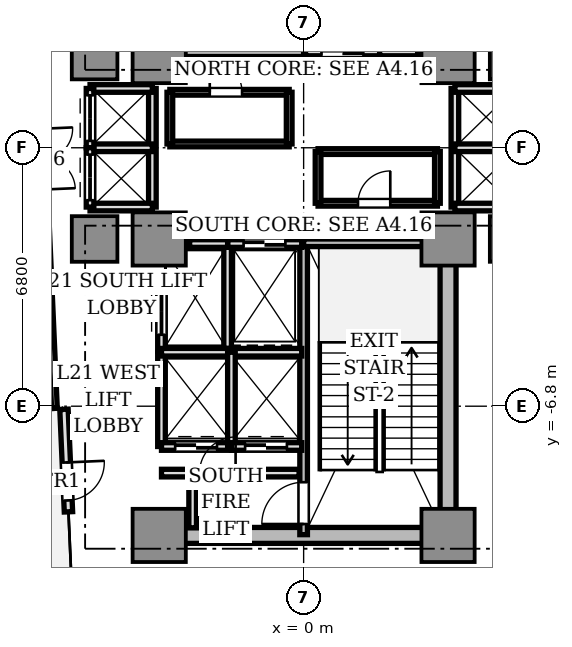
"""IFC4 building model, lengths in metres.
Left out: names, types, materials, properties, quantities, classifications, styles, units other than length and angle.
Written with IfcOpenShell. Run it as: python <this file> out.ifc"""

import sys

from ifc_helpers import new_model, si_unit, direction, frame, frame_2d, origin, origin_2d, place, context, subcontext, project, spatial, rectangle, extrude, source, transform, mapped, element, fill, save


model = new_model("IFC4")
c1 = context("Model", 3, precision=1e-05, world=origin(), true_north=direction((0.0, 1.0)))
c2 = subcontext(c1, "Body", "Model", "MODEL_VIEW")
j1 = project(units=[si_unit("LENGTHUNIT", "METRE"), si_unit("PLANEANGLEUNIT", "RADIAN")], contexts=[c1])
p1 = place(None, origin())
s1 = spatial("IfcSite", under=j1, at=p1, CompositionType="ELEMENT")
p2 = place(p1, origin())
s2 = spatial("IfcBuilding", under=s1, at=p2, CompositionType="ELEMENT")
p3 = place(p2, frame((0.0, 0.0, 79.0)))
s3 = spatial("IfcBuildingStorey", under=s2, at=p3, CompositionType="ELEMENT", Elevation=79.0)
p4 = place(p3, frame((-3.55, -10.2, 0.0), z_axis=(0.0, 0.0, 1.0), x_axis=(1.0, 0.0, 0.0)))
e1 = element("IfcWall", 1, at=p4, inside=s3, PredefinedType="SHEAR", context=c2, shape_type="SweptSolid", body=[
    extrude(rectangle(XDim=7.1, YDim=0.42, at=frame_2d((3.55, 0.0))), origin(), (0.0, 0.0, 1.0), 4.26),
])
p5 = place(p3, frame((3.8, -9.75, 0.0), z_axis=(0.0, 0.0, 1.0), x_axis=(0.0, 1.0, 0.0)))
e2 = element("IfcWall", 2, at=p5, inside=s3, PredefinedType="SHEAR", context=c2, shape_type="SweptSolid", body=[
    extrude(rectangle(XDim=6.9, YDim=0.42, at=frame_2d((3.45, 0.0))), origin(), (0.0, 0.0, 1.0), 4.26),
])
m1 = source(origin(), c2, "Body", "SweptSolid", [
    extrude(rectangle(XDim=1.4, YDim=1.4, at=origin_2d()), origin(), (0.0, 0.0, 1.0), 4.26),
])
for number, where, z_axis, x_axis in (
    (3, (-3.8, 2.4, 0.0), (0.0, 0.0, 1.0), (1.0, 0.0, 0.0)),
    (4, (3.8, 2.4, 0.0), (0.0, 0.0, 1.0), (1.0, 0.0, 0.0)),
    (5, (-3.8, -2.4, 0.0), (0.0, 0.0, 1.0), (1.0, 0.0, 0.0)),
    (6, (3.8, -2.4, 0.0), (0.0, 0.0, 1.0), (1.0, 0.0, 0.0)),
    (7, (-3.8, -10.2, 0.0), (0.0, 0.0, 1.0), (1.0, 0.0, 0.0)),
    (8, (3.8, -10.2, 0.0), (0.0, 0.0, 1.0), (1.0, 0.0, 0.0)),
):
    element("IfcColumn", number, at=place(p3, frame(where, z_axis=z_axis, x_axis=x_axis)), inside=s3, PredefinedType="COLUMN", context=c2, shape_type="MappedRepresentation", body=[
        mapped(m1, transform((0.0, 0.0, 0.0), scale=1.0)),
    ])
m2 = source(origin(), c2, "Body", "SweptSolid", [
    extrude(rectangle(XDim=1.2, YDim=1.2, at=origin_2d()), origin(), (0.0, 0.0, 1.0), 4.26),
])
for number, where, z_axis, x_axis in (
    (9, (5.5, 2.4, 0.0), (0.0, 0.0, 1.0), (1.0, 0.0, 0.0)),
    (10, (-5.5, 2.4, 0.0), (0.0, 0.0, 1.0), (1.0, 0.0, 0.0)),
    (11, (5.5, -2.4, 0.0), (0.0, 0.0, 1.0), (1.0, 0.0, 0.0)),
    (12, (-5.5, -2.4, 0.0), (0.0, 0.0, 1.0), (1.0, 0.0, 0.0)),
):
    element("IfcColumn", number, at=place(p3, frame(where, z_axis=z_axis, x_axis=x_axis)), inside=s3, PredefinedType="COLUMN", context=c2, shape_type="MappedRepresentation", body=[
        mapped(m2, transform((0.0, 0.0, 0.0), scale=1.0)),
    ])
p6 = place(p3, frame((-6.306, -6.882, 0.0), z_axis=(0.0, 0.0, 1.0), x_axis=(0.043672655174, -0.999045894436, 0.0)))
e13 = element("IfcWall", 13, at=p6, inside=s3, PredefinedType="STANDARD", context=c2, shape_type="SweptSolid", body=[
    extrude(rectangle(XDim=2.7, YDim=0.22, at=frame_2d((1.35, 0.0))), origin(), (0.0, 0.0, 1.0), 4.26),
])
p7 = place(p6, frame((1.4, 0.0, 0.0)))
e14 = element("IfcOpeningElement", 14, at=p7, cuts=e13, PredefinedType="OPENING", context=c2, shape_type="SweptSolid", body=[
    extrude(rectangle(XDim=1.0, YDim=2.2, at=frame_2d((0.5, 1.1))), frame((0.0, 0.12, 0.0), z_axis=(0.0, -1.0, 0.0), x_axis=(1.0, 0.0, 0.0)), (0.0, 0.0, 1.0), 0.24),
])
p8 = place(p3, frame((0.0, 2.5, 0.0), z_axis=(0.0, 0.0, 1.0), x_axis=(0.0, 1.0, 0.0)))
e15 = element("IfcWall", 15, at=p8, inside=s3, PredefinedType="SOLIDWALL", context=c2, shape_type="SweptSolid", body=[
    extrude(rectangle(XDim=7.68, YDim=0.2, at=frame_2d((3.84, 0.0))), origin(), (0.0, 0.0, 1.0), 4.26),
])
p9 = place(p8, frame((6.5, 0.0, 0.0)))
e16 = element("IfcOpeningElement", 16, at=p9, cuts=e15, PredefinedType="OPENING", context=c2, shape_type="SweptSolid", body=[
    extrude(rectangle(XDim=0.95, YDim=2.15, at=frame_2d((0.475, 1.075))), frame((0.0, 0.11, 0.0), z_axis=(0.0, -1.0, 0.0), x_axis=(1.0, 0.0, 0.0)), (0.0, 0.0, 1.0), 0.22),
])
p10 = place(p3, frame((-3.72, 2.5, 0.0), z_axis=(0.0, 0.0, 1.0), x_axis=(1.0, 0.0, 0.0)))
e17 = element("IfcWall", 17, at=p10, inside=s3, PredefinedType="SOLIDWALL", context=c2, shape_type="SweptSolid", body=[
    extrude(rectangle(XDim=3.72, YDim=0.2, at=frame_2d((1.86, 0.0))), origin(), (0.0, 0.0, 1.0), 4.26),
])
p11 = place(p3, frame((0.0, -10.18, 0.0), z_axis=(0.0, 0.0, 1.0), x_axis=(0.0, 1.0, 0.0)))
e18 = element("IfcWall", 18, at=p11, inside=s3, PredefinedType="SOLIDWALL", context=c2, shape_type="SweptSolid", body=[
    extrude(rectangle(XDim=7.68, YDim=0.2, at=frame_2d((3.84, 0.0))), origin(), (0.0, 0.0, 1.0), 4.26),
])
p12 = place(p11, frame((0.28, 0.0, 0.0)))
e19 = element("IfcOpeningElement", 19, at=p12, cuts=e18, PredefinedType="OPENING", context=c2, shape_type="SweptSolid", body=[
    extrude(rectangle(XDim=1.1, YDim=2.15, at=frame_2d((0.55, 1.075))), frame((0.0, 0.11, 0.0), z_axis=(0.0, -1.0, 0.0), x_axis=(1.0, 0.0, 0.0)), (0.0, 0.0, 1.0), 0.22),
])
p13 = place(p3, frame((0.0, -2.5, 0.0), z_axis=(0.0, 0.0, 1.0), x_axis=(1.0, 0.0, 0.0)))
e20 = element("IfcWall", 20, at=p13, inside=s3, PredefinedType="SOLIDWALL", context=c2, shape_type="SweptSolid", body=[
    extrude(rectangle(XDim=3.72, YDim=0.2, at=frame_2d((1.86, 0.0))), origin(), (0.0, 0.0, 1.0), 4.26),
])
p14 = place(p3, frame((2.0, 2.5, 0.0), z_axis=(0.0, 0.0, 1.0), x_axis=(0.0, 1.0, 0.0)))
e21 = element("IfcWall", 21, at=p14, inside=s3, PredefinedType="SOLIDWALL", context=c2, shape_type="SweptSolid", body=[
    extrude(rectangle(XDim=2.78, YDim=0.2, at=frame_2d((1.39, 0.0))), origin(), (0.0, 0.0, 1.0), 3.81),
])
p15 = place(p3, frame((0.05, 2.52, 0.0), z_axis=(0.0, 0.0, 1.0), x_axis=(1.0, 0.0, 0.0)))
e22 = element("IfcWall", 22, at=p15, inside=s3, PredefinedType="SOLIDWALL", context=c2, shape_type="SweptSolid", body=[
    extrude(rectangle(XDim=1.95, YDim=0.2, at=frame_2d((0.975, 0.0))), origin(), (0.0, 0.0, 1.0), 3.81),
])
p16 = place(p15, frame((0.42, 0.0, 0.0)))
e23 = element("IfcOpeningElement", 23, at=p16, cuts=e22, PredefinedType="OPENING", context=c2, shape_type="SweptSolid", body=[
    extrude(rectangle(XDim=1.1, YDim=2.2, at=frame_2d((0.55, 1.1))), frame((0.0, 0.11, 0.0), z_axis=(0.0, -1.0, 0.0), x_axis=(1.0, 0.0, 0.0)), (0.0, 0.0, 1.0), 0.22),
])
p17 = place(p3, frame((-2.0, -5.28, 0.0), z_axis=(0.0, 0.0, 1.0), x_axis=(0.0, 1.0, 0.0)))
e24 = element("IfcWall", 24, at=p17, inside=s3, PredefinedType="SOLIDWALL", context=c2, shape_type="SweptSolid", body=[
    extrude(rectangle(XDim=2.78, YDim=0.2, at=frame_2d((1.39, 0.0))), origin(), (0.0, 0.0, 1.0), 3.81),
])
p18 = place(p3, frame((-2.0, -2.52, 0.0), z_axis=(0.0, 0.0, 1.0), x_axis=(1.0, 0.0, 0.0)))
e25 = element("IfcWall", 25, at=p18, inside=s3, PredefinedType="SOLIDWALL", context=c2, shape_type="SweptSolid", body=[
    extrude(rectangle(XDim=1.95, YDim=0.2, at=frame_2d((0.975, 0.0))), origin(), (0.0, 0.0, 1.0), 3.81),
])
p19 = place(p18, frame((0.42, 0.0, 0.0)))
e26 = element("IfcOpeningElement", 26, at=p19, cuts=e25, PredefinedType="OPENING", context=c2, shape_type="SweptSolid", body=[
    extrude(rectangle(XDim=1.1, YDim=2.2, at=frame_2d((0.55, 1.1))), frame((0.0, 0.11, 0.0), z_axis=(0.0, -1.0, 0.0), x_axis=(1.0, 0.0, 0.0)), (0.0, 0.0, 1.0), 0.22),
])
for number, where, z_axis, x_axis in (
    (27, (2.0, 2.52, 0.0), (0.0, 0.0, 1.0), (1.0, 0.0, 0.0)),
    (28, (-3.0, -2.52, 0.0), (0.0, 0.0, 1.0), (1.0, 0.0, 0.0)),
):
    element("IfcWall", number, at=place(p3, frame(where, z_axis=z_axis, x_axis=x_axis)), inside=s3, PredefinedType="SOLIDWALL", context=c2, shape_type="SweptSolid", body=[
        extrude(rectangle(XDim=1.0, YDim=0.2, at=frame_2d((0.5, 0.0))), origin(), (0.0, 0.0, 1.0), 3.81),
    ])
p20 = place(p3, frame((-3.74, -5.36, 0.0), z_axis=(0.0, 0.0, 1.0), x_axis=(0.0, 1.0, 0.0)))
e29 = element("IfcWall", 29, at=p20, inside=s3, PredefinedType="SOLIDWALL", context=c2, shape_type="SweptSolid", body=[
    extrude(rectangle(XDim=2.08, YDim=0.2, at=frame_2d((1.04, 0.0))), origin(), (0.0, 0.0, 1.0), 3.81),
])
p21 = place(p20, frame((0.44, 0.0, 0.0)))
e30 = element("IfcOpeningElement", 30, at=p21, cuts=e29, PredefinedType="OPENING", context=c2, shape_type="SweptSolid", body=[
    extrude(rectangle(XDim=1.2, YDim=2.2, at=frame_2d((0.6, 1.1))), frame((0.0, 0.11, 0.0), z_axis=(0.0, -1.0, 0.0), x_axis=(1.0, 0.0, 0.0)), (0.0, 0.0, 1.0), 0.22),
])
p22 = place(p3, frame((-3.74, -7.86, 0.0), z_axis=(0.0, 0.0, 1.0), x_axis=(0.0, 1.0, 0.0)))
e31 = element("IfcWall", 31, at=p22, inside=s3, PredefinedType="SOLIDWALL", context=c2, shape_type="SweptSolid", body=[
    extrude(rectangle(XDim=2.48, YDim=0.2, at=frame_2d((1.24, 0.0))), origin(), (0.0, 0.0, 1.0), 3.81),
])
p23 = place(p3, frame((-3.74, -7.86, 0.0), z_axis=(0.0, 0.0, 1.0), x_axis=(1.0, 0.0, 0.0)))
e32 = element("IfcWall", 32, at=p23, inside=s3, PredefinedType="SOLIDWALL", context=c2, shape_type="SweptSolid", body=[
    extrude(rectangle(XDim=1.84, YDim=0.2, at=frame_2d((0.92, 0.0))), origin(), (0.0, 0.0, 1.0), 3.81),
])
p24 = place(p23, frame((0.36, 0.0, 0.0)))
e33 = element("IfcOpeningElement", 33, at=p24, cuts=e32, PredefinedType="OPENING", context=c2, shape_type="SweptSolid", body=[
    extrude(rectangle(XDim=1.1, YDim=2.2, at=frame_2d((0.55, 1.1))), frame((0.0, 0.11, 0.0), z_axis=(0.0, -1.0, 0.0), x_axis=(1.0, 0.0, 0.0)), (0.0, 0.0, 1.0), 0.22),
])
p25 = place(p3, frame((-3.74, -5.38, 0.0), z_axis=(0.0, 0.0, 1.0), x_axis=(1.0, 0.0, 0.0)))
e34 = element("IfcWall", 34, at=p25, inside=s3, PredefinedType="SOLIDWALL", context=c2, shape_type="SweptSolid", body=[
    extrude(rectangle(XDim=3.69, YDim=0.2, at=frame_2d((1.845, 0.0))), origin(), (0.0, 0.0, 1.0), 3.81),
])
p26 = place(p3, frame((-1.9, -7.86, 0.0), z_axis=(0.0, 0.0, 1.0), x_axis=(0.0, 1.0, 0.0)))
e35 = element("IfcWall", 35, at=p26, inside=s3, PredefinedType="SOLIDWALL", context=c2, shape_type="SweptSolid", body=[
    extrude(rectangle(XDim=2.48, YDim=0.2, at=frame_2d((1.24, 0.0))), origin(), (0.0, 0.0, 1.0), 3.81),
])
p27 = place(p3, frame((-1.9, -7.86, 0.0), z_axis=(0.0, 0.0, 1.0), x_axis=(1.0, 0.0, 0.0)))
e36 = element("IfcWall", 36, at=p27, inside=s3, PredefinedType="SOLIDWALL", context=c2, shape_type="SweptSolid", body=[
    extrude(rectangle(XDim=1.85, YDim=0.2, at=frame_2d((0.925, 0.0))), origin(), (0.0, 0.0, 1.0), 3.81),
])
p28 = place(p27, frame((0.36, 0.0, 0.0)))
e37 = element("IfcOpeningElement", 37, at=p28, cuts=e36, PredefinedType="OPENING", context=c2, shape_type="SweptSolid", body=[
    extrude(rectangle(XDim=1.1, YDim=2.2, at=frame_2d((0.55, 1.1))), frame((0.0, 0.11, 0.0), z_axis=(0.0, -1.0, 0.0), x_axis=(1.0, 0.0, 0.0)), (0.0, 0.0, 1.0), 0.22),
])
p29 = place(p3, frame((3.98, -1.56, 0.0), z_axis=(0.0, 0.0, 1.0), x_axis=(0.0, 1.0, 0.0)))
e38 = element("IfcWall", 38, at=p29, inside=s3, PredefinedType="SOLIDWALL", context=c2, shape_type="SweptSolid", body=[
    extrude(rectangle(XDim=3.12, YDim=0.2, at=frame_2d((1.56, 0.0))), origin(), (0.0, 0.0, 1.0), 3.43),
])
for number, where, z_axis, x_axis in (
    (39, (3.98, 1.56, 0.0), (0.0, 0.0, 1.0), (1.0, 0.0, 0.0)),
    (40, (3.98, -1.56, 0.0), (0.0, 0.0, 1.0), (1.0, 0.0, 0.0)),
    (41, (3.98, 0.0, 0.0), (0.0, 0.0, 1.0), (1.0, 0.0, 0.0)),
):
    element("IfcWall", number, at=place(p3, frame(where, z_axis=z_axis, x_axis=x_axis)), inside=s3, PredefinedType="SOLIDWALL", context=c2, shape_type="SweptSolid", body=[
        extrude(rectangle(XDim=1.64, YDim=0.2, at=frame_2d((0.82, 0.0))), origin(), (0.0, 0.0, 1.0), 3.81),
    ])
p30 = place(p3, frame((-3.98, -1.56, 0.0), z_axis=(0.0, 0.0, 1.0), x_axis=(0.0, 1.0, 0.0)))
e42 = element("IfcWall", 42, at=p30, inside=s3, PredefinedType="SOLIDWALL", context=c2, shape_type="SweptSolid", body=[
    extrude(rectangle(XDim=3.12, YDim=0.2, at=frame_2d((1.56, 0.0))), origin(), (0.0, 0.0, 1.0), 3.43),
])
for number, where, z_axis, x_axis in (
    (43, (-5.62, 1.56, 0.0), (0.0, 0.0, 1.0), (1.0, 0.0, 0.0)),
    (44, (-5.62, -1.56, 0.0), (0.0, 0.0, 1.0), (1.0, 0.0, 0.0)),
    (45, (-5.62, 0.0, 0.0), (0.0, 0.0, 1.0), (1.0, 0.0, 0.0)),
):
    element("IfcWall", number, at=place(p3, frame(where, z_axis=z_axis, x_axis=x_axis)), inside=s3, PredefinedType="SOLIDWALL", context=c2, shape_type="SweptSolid", body=[
        extrude(rectangle(XDim=1.64, YDim=0.2, at=frame_2d((0.82, 0.0))), origin(), (0.0, 0.0, 1.0), 3.81),
    ])
p31 = place(p3, frame((-5.62, 0.0, 0.0), z_axis=(0.0, 0.0, 1.0), x_axis=(0.0, 1.0, 0.0)))
e46 = element("IfcWall", 46, at=p31, inside=s3, PredefinedType="SOLIDWALL", context=c2, shape_type="SweptSolid", body=[
    extrude(rectangle(XDim=1.56, YDim=0.2, at=frame_2d((0.78, 0.0))), origin(), (0.0, 0.0, 1.0), 3.81),
])
p32 = place(p31, frame((0.18, 0.0, 0.0)))
e47 = element("IfcOpeningElement", 47, at=p32, cuts=e46, PredefinedType="OPENING", context=c2, shape_type="SweptSolid", body=[
    extrude(rectangle(XDim=1.2, YDim=2.2, at=frame_2d((0.6, 1.1))), frame((0.0, 0.11, 0.0), z_axis=(0.0, -1.0, 0.0), x_axis=(1.0, 0.0, 0.0)), (0.0, 0.0, 1.0), 0.22),
])
p33 = place(p3, frame((-5.62, -1.56, 0.0), z_axis=(0.0, 0.0, 1.0), x_axis=(0.0, 1.0, 0.0)))
e48 = element("IfcWall", 48, at=p33, inside=s3, PredefinedType="SOLIDWALL", context=c2, shape_type="SweptSolid", body=[
    extrude(rectangle(XDim=1.56, YDim=0.2, at=frame_2d((0.78, 0.0))), origin(), (0.0, 0.0, 1.0), 3.81),
])
p34 = place(p33, frame((0.18, 0.0, 0.0)))
e49 = element("IfcOpeningElement", 49, at=p34, cuts=e48, PredefinedType="OPENING", context=c2, shape_type="SweptSolid", body=[
    extrude(rectangle(XDim=1.2, YDim=2.2, at=frame_2d((0.6, 1.1))), frame((0.0, 0.11, 0.0), z_axis=(0.0, -1.0, 0.0), x_axis=(1.0, 0.0, 0.0)), (0.0, 0.0, 1.0), 0.22),
])
p35 = place(p3, frame((-3.74, -8.56, 0.0), z_axis=(0.0, 0.0, 1.0), x_axis=(1.0, 0.0, 0.0)))
e50 = element("IfcWall", 50, at=p35, inside=s3, PredefinedType="SOLIDWALL", context=c2, shape_type="SweptSolid", body=[
    extrude(rectangle(XDim=3.62, YDim=0.2, at=frame_2d((1.81, 0.0))), origin(), (0.0, 0.0, 1.0), 3.81),
])
p36 = place(p35, frame((1.0, 0.0, 0.0)))
e51 = element("IfcOpeningElement", 51, at=p36, cuts=e50, PredefinedType="OPENING", context=c2, shape_type="SweptSolid", body=[
    extrude(rectangle(XDim=0.95, YDim=2.15, at=frame_2d((0.475, 1.075))), frame((0.0, 0.11, 0.0), z_axis=(0.0, -1.0, 0.0), x_axis=(1.0, 0.0, 0.0)), (0.0, 0.0, 1.0), 0.22),
])
p37 = place(p3, frame((-2.92, -10.0, 0.0), z_axis=(0.0, 0.0, 1.0), x_axis=(0.0, 1.0, 0.0)))
e52 = element("IfcWall", 52, at=p37, inside=s3, PredefinedType="SOLIDWALL", context=c2, shape_type="SweptSolid", body=[
    extrude(rectangle(XDim=1.44, YDim=0.2, at=frame_2d((0.72, 0.0))), origin(), (0.0, 0.0, 1.0), 3.81),
])
p38 = place(p3, frame((-3.52, 0.1, 0.0), z_axis=(0.0, 0.0, 1.0), x_axis=(1.0, 0.0, 0.0)))
e53 = element("IfcWall", 53, at=p38, inside=s3, PredefinedType="PARTITIONING", context=c2, shape_type="SweptSolid", body=[
    extrude(rectangle(XDim=3.14, YDim=0.15, at=frame_2d((1.57, 0.0))), origin(), (0.0, 0.0, 1.0), 3.81),
])
p39 = place(p3, frame((-3.52, 1.46, 0.0), z_axis=(0.0, 0.0, 1.0), x_axis=(1.0, 0.0, 0.0)))
e54 = element("IfcWall", 54, at=p39, inside=s3, PredefinedType="PARTITIONING", context=c2, shape_type="SweptSolid", body=[
    extrude(rectangle(XDim=3.14, YDim=0.15, at=frame_2d((1.57, 0.0))), origin(), (0.0, 0.0, 1.0), 3.81),
])
p40 = place(p39, frame((1.05, 0.0, 0.0)))
e55 = element("IfcOpeningElement", 55, at=p40, cuts=e54, PredefinedType="OPENING", context=c2, shape_type="SweptSolid", body=[
    extrude(rectangle(XDim=0.85, YDim=2.1, at=frame_2d((0.425, 1.05))), frame((0.0, 0.085, 0.0), z_axis=(0.0, -1.0, 0.0), x_axis=(1.0, 0.0, 0.0)), (0.0, 0.0, 1.0), 0.17),
])
p41 = place(p3, frame((-3.52, 0.1, 0.0), z_axis=(0.0, 0.0, 1.0), x_axis=(0.0, 1.0, 0.0)))
e56 = element("IfcWall", 56, at=p41, inside=s3, PredefinedType="PARTITIONING", context=c2, shape_type="SweptSolid", body=[
    extrude(rectangle(XDim=1.36, YDim=0.15, at=frame_2d((0.68, 0.0))), origin(), (0.0, 0.0, 1.0), 3.43),
])
p42 = place(p3, frame((-0.38, 0.1, 0.0), z_axis=(0.0, 0.0, 1.0), x_axis=(0.0, 1.0, 0.0)))
e57 = element("IfcWall", 57, at=p42, inside=s3, PredefinedType="PARTITIONING", context=c2, shape_type="SweptSolid", body=[
    extrude(rectangle(XDim=1.36, YDim=0.15, at=frame_2d((0.68, 0.0))), origin(), (0.0, 0.0, 1.0), 3.81),
])
p43 = place(p3, frame((0.38, -0.1, 0.0), z_axis=(0.0, 0.0, 1.0), x_axis=(1.0, 0.0, 0.0)))
e58 = element("IfcWall", 58, at=p43, inside=s3, PredefinedType="PARTITIONING", context=c2, shape_type="SweptSolid", body=[
    extrude(rectangle(XDim=3.14, YDim=0.15, at=frame_2d((1.57, 0.0))), origin(), (0.0, 0.0, 1.0), 3.81),
])
p44 = place(p3, frame((0.38, -1.46, 0.0), z_axis=(0.0, 0.0, 1.0), x_axis=(1.0, 0.0, 0.0)))
e59 = element("IfcWall", 59, at=p44, inside=s3, PredefinedType="PARTITIONING", context=c2, shape_type="SweptSolid", body=[
    extrude(rectangle(XDim=3.14, YDim=0.15, at=frame_2d((1.57, 0.0))), origin(), (0.0, 0.0, 1.0), 3.81),
])
p45 = place(p44, frame((1.05, 0.0, 0.0)))
e60 = element("IfcOpeningElement", 60, at=p45, cuts=e59, PredefinedType="OPENING", context=c2, shape_type="SweptSolid", body=[
    extrude(rectangle(XDim=0.85, YDim=2.1, at=frame_2d((0.425, 1.05))), frame((0.0, 0.085, 0.0), z_axis=(0.0, -1.0, 0.0), x_axis=(1.0, 0.0, 0.0)), (0.0, 0.0, 1.0), 0.17),
])
p46 = place(p3, frame((0.38, -1.46, 0.0), z_axis=(0.0, 0.0, 1.0), x_axis=(0.0, 1.0, 0.0)))
e61 = element("IfcWall", 61, at=p46, inside=s3, PredefinedType="PARTITIONING", context=c2, shape_type="SweptSolid", body=[
    extrude(rectangle(XDim=1.36, YDim=0.15, at=frame_2d((0.68, 0.0))), origin(), (0.0, 0.0, 1.0), 3.81),
])
p47 = place(p3, frame((3.52, -1.46, 0.0), z_axis=(0.0, 0.0, 1.0), x_axis=(0.0, 1.0, 0.0)))
e62 = element("IfcWall", 62, at=p47, inside=s3, PredefinedType="PARTITIONING", context=c2, shape_type="SweptSolid", body=[
    extrude(rectangle(XDim=1.36, YDim=0.15, at=frame_2d((0.68, 0.0))), origin(), (0.0, 0.0, 1.0), 3.43),
])
p48 = place(p3, frame((-7.129, 6.245, 0.0), z_axis=(0.0, 0.0, 1.0), x_axis=(0.043609488494, -0.999048653727, 0.0)))
e63 = element("IfcWall", 63, at=p48, inside=s3, PredefinedType="PARTITIONING", context=c2, shape_type="SweptSolid", body=[
    extrude(rectangle(XDim=13.1, YDim=0.15, at=frame_2d((6.55, 0.0))), origin(), (0.0, 0.0, 1.0), 3.81),
])
p49 = place(p48, frame((5.75, 0.0, 0.0)))
e64 = element("IfcOpeningElement", 64, at=p49, cuts=e63, PredefinedType="OPENING", context=c2, shape_type="SweptSolid", body=[
    extrude(rectangle(XDim=1.6, YDim=2.25, at=frame_2d((0.8, 1.125))), frame((0.0, 0.085, 0.0), z_axis=(0.0, -1.0, 0.0), x_axis=(1.0, 0.0, 0.0)), (0.0, 0.0, 1.0), 0.17),
])
m3 = source(origin(), c2, "Body", "SweptSolid", [
    extrude(rectangle(XDim=1.0, YDim=0.05, at=origin_2d()), origin(), (0.0, 0.0, 1.0), 2.2),
])
p50 = place(p7, frame((0.5, 0.0, 0.0)))
e65 = element("IfcDoor", 65, at=p50, inside=s3, OperationType="SINGLE_SWING_LEFT", PredefinedType="DOOR", context=c2, shape_type="MappedRepresentation", body=[
    mapped(m3, transform((0.0, 0.0, 0.0), scale=1.0)),
])
fill(e14, e65)
m4 = source(origin(), c2, "Body", "SweptSolid", [
    extrude(rectangle(XDim=1.1, YDim=0.05, at=origin_2d()), origin(), (0.0, 0.0, 1.0), 2.2),
])
p51 = place(p16, frame((0.55, 0.0, 0.0)))
e66 = element("IfcDoor", 66, at=p51, inside=s3, OperationType="DOUBLE_DOOR_SLIDING", PredefinedType="DOOR", context=c2, shape_type="MappedRepresentation", body=[
    mapped(m4, transform((0.0, 0.0, 0.0), scale=1.0)),
])
fill(e23, e66)
p52 = place(p19, frame((0.55, 0.0, 0.0)))
e67 = element("IfcDoor", 67, at=p52, inside=s3, OperationType="DOUBLE_DOOR_SLIDING", PredefinedType="DOOR", context=c2, shape_type="MappedRepresentation", body=[
    mapped(m4, transform((0.0, 0.0, 0.0), scale=1.0)),
])
fill(e26, e67)
m5 = source(origin(), c2, "Body", "SweptSolid", [
    extrude(rectangle(XDim=1.2, YDim=0.05, at=origin_2d()), origin(), (0.0, 0.0, 1.0), 2.2),
])
p53 = place(p21, frame((0.6, 0.0, 0.0)))
e68 = element("IfcDoor", 68, at=p53, inside=s3, OperationType="DOUBLE_DOOR_SLIDING", PredefinedType="DOOR", context=c2, shape_type="MappedRepresentation", body=[
    mapped(m5, transform((0.0, 0.0, 0.0), scale=1.0)),
])
fill(e30, e68)
p54 = place(p24, frame((0.55, 0.0, 0.0)))
e69 = element("IfcDoor", 69, at=p54, inside=s3, OperationType="DOUBLE_DOOR_SLIDING", PredefinedType="DOOR", context=c2, shape_type="MappedRepresentation", body=[
    mapped(m4, transform((0.0, 0.0, 0.0), scale=1.0)),
])
fill(e33, e69)
p55 = place(p28, frame((0.55, 0.0, 0.0)))
e70 = element("IfcDoor", 70, at=p55, inside=s3, OperationType="DOUBLE_DOOR_SLIDING", PredefinedType="DOOR", context=c2, shape_type="MappedRepresentation", body=[
    mapped(m4, transform((0.0, 0.0, 0.0), scale=1.0)),
])
fill(e37, e70)
p56 = place(p32, frame((0.6, 0.0, 0.0)))
e71 = element("IfcDoor", 71, at=p56, inside=s3, OperationType="DOUBLE_DOOR_SLIDING", PredefinedType="DOOR", context=c2, shape_type="MappedRepresentation", body=[
    mapped(m5, transform((0.0, 0.0, 0.0), scale=1.0)),
])
fill(e47, e71)
p57 = place(p34, frame((0.6, 0.0, 0.0)))
e72 = element("IfcDoor", 72, at=p57, inside=s3, OperationType="DOUBLE_DOOR_SLIDING", PredefinedType="DOOR", context=c2, shape_type="MappedRepresentation", body=[
    mapped(m5, transform((0.0, 0.0, 0.0), scale=1.0)),
])
fill(e49, e72)
m6 = source(origin(), c2, "Body", "SweptSolid", [
    extrude(rectangle(XDim=1.1, YDim=0.05, at=origin_2d()), origin(), (0.0, 0.0, 1.0), 2.15),
])
p58 = place(p12, frame((0.55, 0.0, 0.0)))
e73 = element("IfcDoor", 73, at=p58, inside=s3, OperationType="SINGLE_SWING_LEFT", PredefinedType="DOOR", context=c2, shape_type="MappedRepresentation", body=[
    mapped(m6, transform((0.0, 0.0, 0.0), scale=1.0)),
])
fill(e19, e73)
m7 = source(origin(), c2, "Body", "SweptSolid", [
    extrude(rectangle(XDim=0.95, YDim=0.05, at=origin_2d()), origin(), (0.0, 0.0, 1.0), 2.15),
])
p59 = place(p36, frame((0.475, 0.0, 0.0)))
e74 = element("IfcDoor", 74, at=p59, inside=s3, OperationType="SINGLE_SWING_RIGHT", PredefinedType="DOOR", context=c2, shape_type="MappedRepresentation", body=[
    mapped(m7, transform((0.0, 0.0, 0.0), scale=1.0)),
])
fill(e51, e74)
m8 = source(origin(), c2, "Body", "SweptSolid", [
    extrude(rectangle(XDim=0.85, YDim=0.05, at=origin_2d()), origin(), (0.0, 0.0, 1.0), 2.1),
])
p60 = place(p40, frame((0.425, 0.0, 0.0)))
e75 = element("IfcDoor", 75, at=p60, inside=s3, OperationType="SINGLE_SWING_LEFT", PredefinedType="DOOR", context=c2, shape_type="MappedRepresentation", body=[
    mapped(m8, transform((0.0, 0.0, 0.0), scale=1.0)),
])
fill(e55, e75)
p61 = place(p45, frame((0.425, 0.0, 0.0)))
e76 = element("IfcDoor", 76, at=p61, inside=s3, OperationType="SINGLE_SWING_RIGHT", PredefinedType="DOOR", context=c2, shape_type="MappedRepresentation", body=[
    mapped(m8, transform((0.0, 0.0, 0.0), scale=1.0)),
])
fill(e60, e76)
save(model, sys.argv[1])
